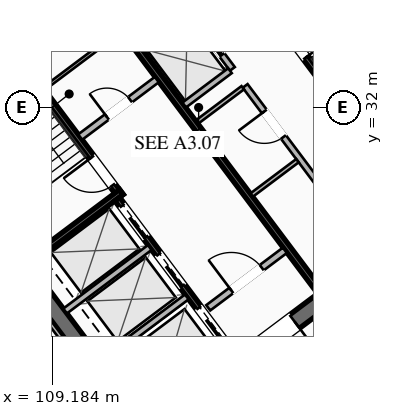
"""IFC4 building model, lengths in metres.
Left out: names, types, materials, properties, quantities, classifications, styles, units other than length and angle.
Written with IfcOpenShell. Run it as: python <this file> out.ifc"""

import sys

from ifc_helpers import new_model, si_unit, direction, frame, frame_2d, origin, place, context, subcontext, project, spatial, rectangle, extrude, element, fill, save


model = new_model("IFC4")
c1 = context("Model", 3, precision=1e-05, world=origin(), true_north=direction((0.0, 1.0)))
c2 = subcontext(c1, "Body", "Model", "MODEL_VIEW")
j1 = project(units=[si_unit("LENGTHUNIT", "METRE"), si_unit("PLANEANGLEUNIT", "RADIAN")], contexts=[c1])
p1 = place(None, origin())
s1 = spatial("IfcSite", under=j1, at=p1, CompositionType="ELEMENT")
p2 = place(p1, origin())
s2 = spatial("IfcBuilding", under=s1, at=p2, CompositionType="ELEMENT")
p3 = place(p2, frame((0.0, 0.0, 128.6)))
s3 = spatial("IfcBuildingStorey", under=s2, at=p3, CompositionType="ELEMENT", Elevation=128.6)
for number, where, z_axis, x_axis in (
    (1, (112.436, 21.077, 0.0), (0.0, 0.0, 1.0), (-0.6, 0.8, 0.0)),
    (2, (115.564, 42.923, 0.0), (0.0, 0.0, 1.0), (0.6, -0.8, 0.0)),
):
    element("IfcWall", number, at=place(p3, frame(where, z_axis=z_axis, x_axis=x_axis)), inside=s3, PredefinedType="SHEAR", context=c2, shape_type="SweptSolid", body=[
        extrude(rectangle(XDim=15.6, YDim=0.55, at=frame_2d((7.8, 0.0))), origin(), (0.0, 0.0, 1.0), 3.55),
    ])
p4 = place(p3, frame((124.539, 30.498, 0.0), z_axis=(0.0, 0.0, 1.0), x_axis=(-0.799998054672, -0.600002593761, 0.0)))
e3 = element("IfcWall", 3, at=p4, inside=s3, PredefinedType="SHEAR", context=c2, shape_type="SweptSolid", body=[
    extrude(rectangle(XDim=15.06, YDim=0.55, at=frame_2d((7.53, 0.0))), origin(), (0.0, 0.0, 1.0), 3.55),
])
p5 = place(p4, frame((9.23, 0.0, 0.0)))
e4 = element("IfcOpeningElement", 4, at=p5, cuts=e3, PredefinedType="OPENING", context=c2, shape_type="SweptSolid", body=[
    extrude(rectangle(XDim=1.25, YDim=2.25, at=frame_2d((0.625, 1.125))), frame((0.0, 0.285, 0.0), z_axis=(0.0, -1.0, 0.0), x_axis=(1.0, 0.0, 0.0)), (0.0, 0.0, 1.0), 0.57),
])
p6 = place(p4, frame((4.18, 0.0, 0.0)))
e5 = element("IfcOpeningElement", 5, at=p6, cuts=e3, PredefinedType="OPENING", context=c2, shape_type="SweptSolid", body=[
    extrude(rectangle(XDim=1.25, YDim=2.25, at=frame_2d((0.625, 1.125))), frame((0.0, 0.285, 0.0), z_axis=(0.0, -1.0, 0.0), x_axis=(1.0, 0.0, 0.0)), (0.0, 0.0, 1.0), 0.57),
])
p7 = place(p3, frame((103.461, 33.502, 0.0), z_axis=(0.0, 0.0, 1.0), x_axis=(0.799998054672, 0.600002593761, 0.0)))
e6 = element("IfcWall", 6, at=p7, inside=s3, PredefinedType="SHEAR", context=c2, shape_type="SweptSolid", body=[
    extrude(rectangle(XDim=15.06, YDim=0.55, at=frame_2d((7.53, 0.0))), origin(), (0.0, 0.0, 1.0), 3.55),
])
p8 = place(p7, frame((4.58, 0.0, 0.0)))
e7 = element("IfcOpeningElement", 7, at=p8, cuts=e6, PredefinedType="OPENING", context=c2, shape_type="SweptSolid", body=[
    extrude(rectangle(XDim=1.25, YDim=2.25, at=frame_2d((0.625, 1.125))), frame((0.0, 0.285, 0.0), z_axis=(0.0, -1.0, 0.0), x_axis=(1.0, 0.0, 0.0)), (0.0, 0.0, 1.0), 0.57),
])
p9 = place(p7, frame((9.63, 0.0, 0.0)))
e8 = element("IfcOpeningElement", 8, at=p9, cuts=e6, PredefinedType="OPENING", context=c2, shape_type="SweptSolid", body=[
    extrude(rectangle(XDim=1.25, YDim=2.25, at=frame_2d((0.625, 1.125))), frame((0.0, 0.285, 0.0), z_axis=(0.0, -1.0, 0.0), x_axis=(1.0, 0.0, 0.0)), (0.0, 0.0, 1.0), 0.57),
])
p10 = place(p3, frame((111.44, 29.08, 0.0), z_axis=(0.0, 0.0, 1.0), x_axis=(-0.59999029481, 0.8000072788, 0.0)))
e9 = element("IfcWall", 9, at=p10, inside=s3, PredefinedType="SHEAR", context=c2, shape_type="SweptSolid", body=[
    extrude(rectangle(XDim=8.05, YDim=0.2, at=frame_2d((4.025, 0.0))), origin(), (0.0, 0.0, 1.0), 3.37),
])
p11 = place(p10, frame((0.45, 0.0, 0.0)))
e10 = element("IfcOpeningElement", 10, at=p11, cuts=e9, PredefinedType="OPENING", context=c2, shape_type="SweptSolid", body=[
    extrude(rectangle(XDim=1.15, YDim=2.2, at=frame_2d((0.575, 1.1))), frame((0.0, 0.11, 0.0), z_axis=(0.0, -1.0, 0.0), x_axis=(1.0, 0.0, 0.0)), (0.0, 0.0, 1.0), 0.22),
])
p12 = place(p3, frame((108.396, 26.922, 0.0), z_axis=(0.0, 0.0, 1.0), x_axis=(0.800015298837, 0.599979601008, 0.0)))
e11 = element("IfcWall", 11, at=p12, inside=s3, PredefinedType="SHEAR", context=c2, shape_type="SweptSolid", body=[
    extrude(rectangle(XDim=3.83, YDim=0.2, at=frame_2d((1.915, 0.0))), origin(), (0.0, 0.0, 1.0), 3.37),
])
p13 = place(p3, frame((116.56, 34.92, 0.0), z_axis=(0.0, 0.0, 1.0), x_axis=(0.59999029481, -0.8000072788, 0.0)))
e12 = element("IfcWall", 12, at=p13, inside=s3, PredefinedType="SHEAR", context=c2, shape_type="SweptSolid", body=[
    extrude(rectangle(XDim=8.05, YDim=0.2, at=frame_2d((4.025, 0.0))), origin(), (0.0, 0.0, 1.0), 3.37),
])
p14 = place(p13, frame((0.45, 0.0, 0.0)))
e13 = element("IfcOpeningElement", 13, at=p14, cuts=e12, PredefinedType="OPENING", context=c2, shape_type="SweptSolid", body=[
    extrude(rectangle(XDim=1.15, YDim=2.2, at=frame_2d((0.575, 1.1))), frame((0.0, 0.11, 0.0), z_axis=(0.0, -1.0, 0.0), x_axis=(1.0, 0.0, 0.0)), (0.0, 0.0, 1.0), 0.22),
])
p15 = place(p3, frame((117.998, 25.936, 0.0), z_axis=(0.0, 0.0, 1.0), x_axis=(-0.600002693989, 0.799997979501, 0.0)))
e14 = element("IfcWall", 14, at=p15, inside=s3, PredefinedType="SHEAR", context=c2, shape_type="SweptSolid", body=[
    extrude(rectangle(XDim=14.5, YDim=0.2, at=frame_2d((7.25, 0.0))), origin(), (0.0, 0.0, 1.0), 3.37),
])
p16 = place(p3, frame((110.104, 31.028, 0.0), z_axis=(0.0, 0.0, 1.0), x_axis=(0.800018601094, 0.59997519774, 0.0)))
e15 = element("IfcWall", 15, at=p16, inside=s3, PredefinedType="SOLIDWALL", context=c2, shape_type="SweptSolid", body=[
    extrude(rectangle(XDim=3.15, YDim=0.22, at=frame_2d((1.575, 0.0))), origin(), (0.0, 0.0, 1.0), 2.723),
])
p17 = place(p16, frame((1.1, 0.0, 0.0)))
e16 = element("IfcOpeningElement", 16, at=p17, cuts=e15, PredefinedType="OPENING", context=c2, shape_type="SweptSolid", body=[
    extrude(rectangle(XDim=0.95, YDim=2.05, at=frame_2d((0.475, 1.025))), frame((0.0, 0.12, 0.0), z_axis=(0.0, -1.0, 0.0), x_axis=(1.0, 0.0, 0.0)), (0.0, 0.0, 1.0), 0.24),
])
p18 = place(p3, frame((114.316, 25.412, 0.0), z_axis=(0.0, 0.0, 1.0), x_axis=(0.800018601094, 0.59997519774, 0.0)))
e17 = element("IfcWall", 17, at=p18, inside=s3, PredefinedType="SOLIDWALL", context=c2, shape_type="SweptSolid", body=[
    extrude(rectangle(XDim=3.15, YDim=0.22, at=frame_2d((1.575, 0.0))), origin(), (0.0, 0.0, 1.0), 2.723),
])
p19 = place(p18, frame((0.95, 0.0, 0.0)))
e18 = element("IfcOpeningElement", 18, at=p19, cuts=e17, PredefinedType="OPENING", context=c2, shape_type="SweptSolid", body=[
    extrude(rectangle(XDim=1.25, YDim=2.25, at=frame_2d((0.625, 1.125))), frame((0.0, 0.12, 0.0), z_axis=(0.0, -1.0, 0.0), x_axis=(1.0, 0.0, 0.0)), (0.0, 0.0, 1.0), 0.24),
])
p20 = place(p3, frame((115.19, 23.83, 0.0), z_axis=(0.0, 0.0, 1.0), x_axis=(-0.599993943644, 0.800004542231, 0.0)))
e19 = element("IfcWall", 19, at=p20, inside=s3, PredefinedType="SHEAR", context=c2, shape_type="SweptSolid", body=[
    extrude(rectangle(XDim=6.45, YDim=0.2, at=frame_2d((3.225, 0.0))), origin(), (0.0, 0.0, 1.0), 3.37),
])
p21 = place(p20, frame((4.875, 0.0, 0.0)))
e20 = element("IfcOpeningElement", 20, at=p21, cuts=e19, PredefinedType="OPENING", context=c2, shape_type="SweptSolid", body=[
    extrude(rectangle(XDim=1.3, YDim=2.25, at=frame_2d((0.65, 1.125))), frame((0.0, 0.11, 0.0), z_axis=(0.0, -1.0, 0.0), x_axis=(1.0, 0.0, 0.0)), (0.0, 0.0, 1.0), 0.22),
])
p22 = place(p20, frame((2.875, 0.0, 0.0)))
e21 = element("IfcOpeningElement", 21, at=p22, cuts=e19, PredefinedType="OPENING", context=c2, shape_type="SweptSolid", body=[
    extrude(rectangle(XDim=1.3, YDim=2.25, at=frame_2d((0.65, 1.125))), frame((0.0, 0.11, 0.0), z_axis=(0.0, -1.0, 0.0), x_axis=(1.0, 0.0, 0.0)), (0.0, 0.0, 1.0), 0.22),
])
p23 = place(p20, frame((0.675, 0.0, 0.0)))
e22 = element("IfcOpeningElement", 22, at=p23, cuts=e19, PredefinedType="OPENING", context=c2, shape_type="SweptSolid", body=[
    extrude(rectangle(XDim=1.3, YDim=2.25, at=frame_2d((0.65, 1.125))), frame((0.0, 0.11, 0.0), z_axis=(0.0, -1.0, 0.0), x_axis=(1.0, 0.0, 0.0)), (0.0, 0.0, 1.0), 0.22),
])
for number, where, z_axis, x_axis in (
    (23, (110.826, 23.682, 0.0), (0.0, 0.0, 1.0), (0.8, 0.6, 0.0)),
    (24, (109.608, 25.306, 0.0), (0.0, 0.0, 1.0), (0.8, 0.6, 0.0)),
):
    element("IfcWall", number, at=place(p3, frame(where, z_axis=z_axis, x_axis=x_axis)), inside=s3, PredefinedType="SOLIDWALL", context=c2, shape_type="SweptSolid", body=[
        extrude(rectangle(XDim=3.48, YDim=0.2, at=frame_2d((1.74, 0.0))), origin(), (0.0, 0.0, 1.0), 3.37),
    ])
p24 = place(p3, frame((108.91, 32.62, 0.0), z_axis=(0.0, 0.0, 1.0), x_axis=(0.800018601094, 0.59997519774, 0.0)))
e25 = element("IfcWall", 25, at=p24, inside=s3, PredefinedType="PARTITIONING", context=c2, shape_type="SweptSolid", body=[
    extrude(rectangle(XDim=3.15, YDim=0.11, at=frame_2d((1.575, 0.0))), origin(), (0.0, 0.0, 1.0), 2.723),
])
p25 = place(p3, frame((119.67, 27.19, 0.0), z_axis=(0.0, 0.0, 1.0), x_axis=(-0.599988677396, 0.800008491828, 0.0)))
e26 = element("IfcWall", 26, at=p25, inside=s3, PredefinedType="SOLIDWALL", context=c2, shape_type="SweptSolid", body=[
    extrude(rectangle(XDim=6.9, YDim=0.2, at=frame_2d((3.45, 0.0))), origin(), (0.0, 0.0, 1.0), 2.723),
])
p26 = place(p25, frame((0.85, 0.0, 0.0)))
e27 = element("IfcOpeningElement", 27, at=p26, cuts=e26, PredefinedType="OPENING", context=c2, shape_type="SweptSolid", body=[
    extrude(rectangle(XDim=0.95, YDim=2.05, at=frame_2d((0.475, 1.025))), frame((0.0, 0.11, 0.0), z_axis=(0.0, -1.0, 0.0), x_axis=(1.0, 0.0, 0.0)), (0.0, 0.0, 1.0), 0.22),
])
p27 = place(p25, frame((4.8, 0.0, 0.0)))
e28 = element("IfcOpeningElement", 28, at=p27, cuts=e26, PredefinedType="OPENING", context=c2, shape_type="SweptSolid", body=[
    extrude(rectangle(XDim=1.05, YDim=2.2, at=frame_2d((0.525, 1.1))), frame((0.0, 0.11, 0.0), z_axis=(0.0, -1.0, 0.0), x_axis=(1.0, 0.0, 0.0)), (0.0, 0.0, 1.0), 0.22),
])
for number, where, z_axis, x_axis in (
    (29, (113.946, 31.522, 0.0), (0.0, 0.0, 1.0), (0.8, 0.6, 0.0)),
    (30, (115.746, 29.122, 0.0), (0.0, 0.0, 1.0), (0.8, 0.6, 0.0)),
):
    element("IfcWall", number, at=place(p3, frame(where, z_axis=z_axis, x_axis=x_axis)), inside=s3, PredefinedType="PARTITIONING", context=c2, shape_type="SweptSolid", body=[
        extrude(rectangle(XDim=1.88, YDim=0.135, at=frame_2d((0.94, 0.0))), origin(), (0.0, 0.0, 1.0), 2.723),
    ])
p28 = place(p3, frame((115.11, 33.27, 0.0), z_axis=(0.0, 0.0, 1.0), x_axis=(-0.600011322243, 0.799991508192, 0.0)))
e31 = element("IfcWall", 31, at=p28, inside=s3, PredefinedType="SOLIDWALL", context=c2, shape_type="SweptSolid", body=[
    extrude(rectangle(XDim=6.9, YDim=0.2, at=frame_2d((3.45, 0.0))), origin(), (0.0, 0.0, 1.0), 3.37),
])
p29 = place(p28, frame((0.575, 0.0, 0.0)))
e32 = element("IfcOpeningElement", 32, at=p29, cuts=e31, PredefinedType="OPENING", context=c2, shape_type="SweptSolid", body=[
    extrude(rectangle(XDim=1.1, YDim=2.2, at=frame_2d((0.55, 1.1))), frame((0.0, 0.11, 0.0), z_axis=(0.0, -1.0, 0.0), x_axis=(1.0, 0.0, 0.0)), (0.0, 0.0, 1.0), 0.22),
])
p30 = place(p28, frame((2.825, 0.0, 0.0)))
e33 = element("IfcOpeningElement", 33, at=p30, cuts=e31, PredefinedType="OPENING", context=c2, shape_type="SweptSolid", body=[
    extrude(rectangle(XDim=1.1, YDim=2.2, at=frame_2d((0.55, 1.1))), frame((0.0, 0.11, 0.0), z_axis=(0.0, -1.0, 0.0), x_axis=(1.0, 0.0, 0.0)), (0.0, 0.0, 1.0), 0.22),
])
p31 = place(p28, frame((5.075, 0.0, 0.0)))
e34 = element("IfcOpeningElement", 34, at=p31, cuts=e31, PredefinedType="OPENING", context=c2, shape_type="SweptSolid", body=[
    extrude(rectangle(XDim=1.1, YDim=2.2, at=frame_2d((0.55, 1.1))), frame((0.0, 0.11, 0.0), z_axis=(0.0, -1.0, 0.0), x_axis=(1.0, 0.0, 0.0)), (0.0, 0.0, 1.0), 0.22),
])
p32 = place(p3, frame((113.526, 32.082, 0.0), z_axis=(0.0, 0.0, 1.0), x_axis=(0.800046745961, 0.599937666993, 0.0)))
e35 = element("IfcWall", 35, at=p32, inside=s3, PredefinedType="SOLIDWALL", context=c2, shape_type="SweptSolid", body=[
    extrude(rectangle(XDim=1.88, YDim=0.2, at=frame_2d((0.94, 0.0))), origin(), (0.0, 0.0, 1.0), 3.37),
])
p33 = place(p3, frame((112.176, 33.882, 0.0), z_axis=(0.0, 0.0, 1.0), x_axis=(0.8, 0.6, 0.0)))
e36 = element("IfcWall", 36, at=p33, inside=s3, PredefinedType="SOLIDWALL", context=c2, shape_type="SweptSolid", body=[
    extrude(rectangle(XDim=1.88, YDim=0.2, at=frame_2d((0.94, 0.0))), origin(), (0.0, 0.0, 1.0), 3.37),
])
p34 = place(p3, frame((95.42, 30.69, 0.0), z_axis=(0.0, 0.0, 1.0), x_axis=(0.8, 0.6, 0.0)))
e37 = element("IfcWall", 37, at=p34, inside=s3, PredefinedType="PARTITIONING", context=c2, shape_type="SweptSolid", body=[
    extrude(rectangle(XDim=31.3, YDim=0.135, at=frame_2d((15.65, 0.0))), origin(), (0.0, 0.0, 1.0), 2.723),
])
p35 = place(p34, frame((0.3, 0.0, 0.0)))
e38 = element("IfcOpeningElement", 38, at=p35, cuts=e37, PredefinedType="OPENING", context=c2, shape_type="SweptSolid", body=[
    extrude(rectangle(XDim=0.95, YDim=2.05, at=frame_2d((0.475, 1.025))), frame((0.0, 0.077, 0.0), z_axis=(0.0, -1.0, 0.0), x_axis=(1.0, 0.0, 0.0)), (0.0, 0.0, 1.0), 0.155),
])
p36 = place(p34, frame((30.05, 0.0, 0.0)))
e39 = element("IfcOpeningElement", 39, at=p36, cuts=e37, PredefinedType="OPENING", context=c2, shape_type="SweptSolid", body=[
    extrude(rectangle(XDim=0.95, YDim=2.05, at=frame_2d((0.475, 1.025))), frame((0.0, 0.077, 0.0), z_axis=(0.0, -1.0, 0.0), x_axis=(1.0, 0.0, 0.0)), (0.0, 0.0, 1.0), 0.155),
])
p37 = place(p3, frame((132.262, 33.734, 0.0), z_axis=(0.0, 0.0, 1.0), x_axis=(-0.800003744006, -0.59999500796, 0.0)))
e40 = element("IfcWall", 40, at=p37, inside=s3, PredefinedType="PARTITIONING", context=c2, shape_type="SweptSolid", body=[
    extrude(rectangle(XDim=31.3, YDim=0.135, at=frame_2d((15.65, 0.0))), origin(), (0.0, 0.0, 1.0), 2.723),
])
p38 = place(p37, frame((29.97, 0.0, 0.0)))
e41 = element("IfcOpeningElement", 41, at=p38, cuts=e40, PredefinedType="OPENING", context=c2, shape_type="SweptSolid", body=[
    extrude(rectangle(XDim=0.95, YDim=2.05, at=frame_2d((0.475, 1.025))), frame((0.0, 0.077, 0.0), z_axis=(0.0, -1.0, 0.0), x_axis=(1.0, 0.0, 0.0)), (0.0, 0.0, 1.0), 0.155),
])
p39 = place(p37, frame((15.43, 0.0, 0.0)))
e42 = element("IfcOpeningElement", 42, at=p39, cuts=e40, PredefinedType="OPENING", context=c2, shape_type="SweptSolid", body=[
    extrude(rectangle(XDim=0.95, YDim=2.05, at=frame_2d((0.475, 1.025))), frame((0.0, 0.077, 0.0), z_axis=(0.0, -1.0, 0.0), x_axis=(1.0, 0.0, 0.0)), (0.0, 0.0, 1.0), 0.155),
])
p40 = place(p37, frame((11.146, 0.0, 0.0)))
e43 = element("IfcOpeningElement", 43, at=p40, cuts=e40, PredefinedType="OPENING", context=c2, shape_type="SweptSolid", body=[
    extrude(rectangle(XDim=0.95, YDim=2.05, at=frame_2d((0.475, 1.025))), frame((0.0, 0.077, 0.0), z_axis=(0.0, -1.0, 0.0), x_axis=(1.0, 0.0, 0.0)), (0.0, 0.0, 1.0), 0.155),
])
p41 = place(p37, frame((0.38, 0.0, 0.0)))
e44 = element("IfcOpeningElement", 44, at=p41, cuts=e40, PredefinedType="OPENING", context=c2, shape_type="SweptSolid", body=[
    extrude(rectangle(XDim=0.95, YDim=2.05, at=frame_2d((0.475, 1.025))), frame((0.0, 0.077, 0.0), z_axis=(0.0, -1.0, 0.0), x_axis=(1.0, 0.0, 0.0)), (0.0, 0.0, 1.0), 0.155),
])
p42 = place(p3, frame((112.104, 20.928, 0.0), z_axis=(0.0, 0.0, 1.0), x_axis=(-0.599994940075, 0.800003794918, 0.0)))
e45 = element("IfcWall", 45, at=p42, inside=s3, PredefinedType="PARTITIONING", context=c2, shape_type="SweptSolid", body=[
    extrude(rectangle(XDim=15.44, YDim=0.135, at=frame_2d((7.72, 0.0))), origin(), (0.0, 0.0, 1.0), 2.723),
])
p43 = place(p5, origin())
e46 = element("IfcDoor", 46, at=p43, inside=s3, OperationType="SINGLE_SWING_LEFT", PredefinedType="DOOR", context=c2, shape_type="SweptSolid", body=[
    extrude(rectangle(XDim=1.25, YDim=2.25, at=frame_2d((0.625, 1.125))), frame((0.0, 0.025, 0.0), z_axis=(0.0, -1.0, 0.0), x_axis=(1.0, 0.0, 0.0)), (0.0, 0.0, 1.0), 0.05),
])
fill(e4, e46)
p44 = place(p11, origin())
e47 = element("IfcDoor", 47, at=p44, inside=s3, OperationType="SINGLE_SWING_RIGHT", PredefinedType="DOOR", context=c2, shape_type="SweptSolid", body=[
    extrude(rectangle(XDim=1.15, YDim=2.2, at=frame_2d((0.575, 1.1))), frame((0.0, 0.025, 0.0), z_axis=(0.0, -1.0, 0.0), x_axis=(1.0, 0.0, 0.0)), (0.0, 0.0, 1.0), 0.05),
])
fill(e10, e47)
p45 = place(p14, origin())
e48 = element("IfcDoor", 48, at=p45, inside=s3, OperationType="SINGLE_SWING_RIGHT", PredefinedType="DOOR", context=c2, shape_type="SweptSolid", body=[
    extrude(rectangle(XDim=1.15, YDim=2.2, at=frame_2d((0.575, 1.1))), frame((0.0, 0.025, 0.0), z_axis=(0.0, -1.0, 0.0), x_axis=(1.0, 0.0, 0.0)), (0.0, 0.0, 1.0), 0.05),
])
fill(e13, e48)
p46 = place(p19, origin())
e49 = element("IfcDoor", 49, at=p46, inside=s3, OperationType="SINGLE_SWING_LEFT", PredefinedType="DOOR", context=c2, shape_type="SweptSolid", body=[
    extrude(rectangle(XDim=1.25, YDim=2.25, at=frame_2d((0.625, 1.125))), frame((0.0, 0.025, 0.0), z_axis=(0.0, -1.0, 0.0), x_axis=(1.0, 0.0, 0.0)), (0.0, 0.0, 1.0), 0.05),
])
fill(e18, e49)
p47 = place(p17, origin())
e50 = element("IfcDoor", 50, at=p47, inside=s3, OperationType="SINGLE_SWING_LEFT", PredefinedType="DOOR", context=c2, shape_type="SweptSolid", body=[
    extrude(rectangle(XDim=0.95, YDim=2.05, at=frame_2d((0.475, 1.025))), frame((0.0, 0.025, 0.0), z_axis=(0.0, -1.0, 0.0), x_axis=(1.0, 0.0, 0.0)), (0.0, 0.0, 1.0), 0.05),
])
fill(e16, e50)
p48 = place(p27, origin())
e51 = element("IfcDoor", 51, at=p48, inside=s3, OperationType="SINGLE_SWING_RIGHT", PredefinedType="DOOR", context=c2, shape_type="SweptSolid", body=[
    extrude(rectangle(XDim=1.05, YDim=2.2, at=frame_2d((0.525, 1.1))), frame((0.0, 0.025, 0.0), z_axis=(0.0, -1.0, 0.0), x_axis=(1.0, 0.0, 0.0)), (0.0, 0.0, 1.0), 0.05),
])
fill(e28, e51)
p49 = place(p21, origin())
e52 = element("IfcDoor", 52, at=p49, inside=s3, OperationType="SLIDING_TO_LEFT", PredefinedType="DOOR", context=c2, shape_type="SweptSolid", body=[
    extrude(rectangle(XDim=1.3, YDim=2.25, at=frame_2d((0.65, 1.125))), frame((0.0, 0.025, 0.0), z_axis=(0.0, -1.0, 0.0), x_axis=(1.0, 0.0, 0.0)), (0.0, 0.0, 1.0), 0.05),
])
fill(e20, e52)
p50 = place(p22, origin())
e53 = element("IfcDoor", 53, at=p50, inside=s3, OperationType="SLIDING_TO_LEFT", PredefinedType="DOOR", context=c2, shape_type="SweptSolid", body=[
    extrude(rectangle(XDim=1.3, YDim=2.25, at=frame_2d((0.65, 1.125))), frame((0.0, 0.025, 0.0), z_axis=(0.0, -1.0, 0.0), x_axis=(1.0, 0.0, 0.0)), (0.0, 0.0, 1.0), 0.05),
])
fill(e21, e53)
p51 = place(p23, origin())
e54 = element("IfcDoor", 54, at=p51, inside=s3, OperationType="SLIDING_TO_LEFT", PredefinedType="DOOR", context=c2, shape_type="SweptSolid", body=[
    extrude(rectangle(XDim=1.3, YDim=2.25, at=frame_2d((0.65, 1.125))), frame((0.0, 0.025, 0.0), z_axis=(0.0, -1.0, 0.0), x_axis=(1.0, 0.0, 0.0)), (0.0, 0.0, 1.0), 0.05),
])
fill(e22, e54)
p52 = place(p29, origin())
e55 = element("IfcDoor", 55, at=p52, inside=s3, OperationType="SLIDING_TO_LEFT", PredefinedType="DOOR", context=c2, shape_type="SweptSolid", body=[
    extrude(rectangle(XDim=1.1, YDim=2.2, at=frame_2d((0.55, 1.1))), frame((0.0, 0.025, 0.0), z_axis=(0.0, -1.0, 0.0), x_axis=(1.0, 0.0, 0.0)), (0.0, 0.0, 1.0), 0.05),
])
fill(e32, e55)
save(model, sys.argv[1])
